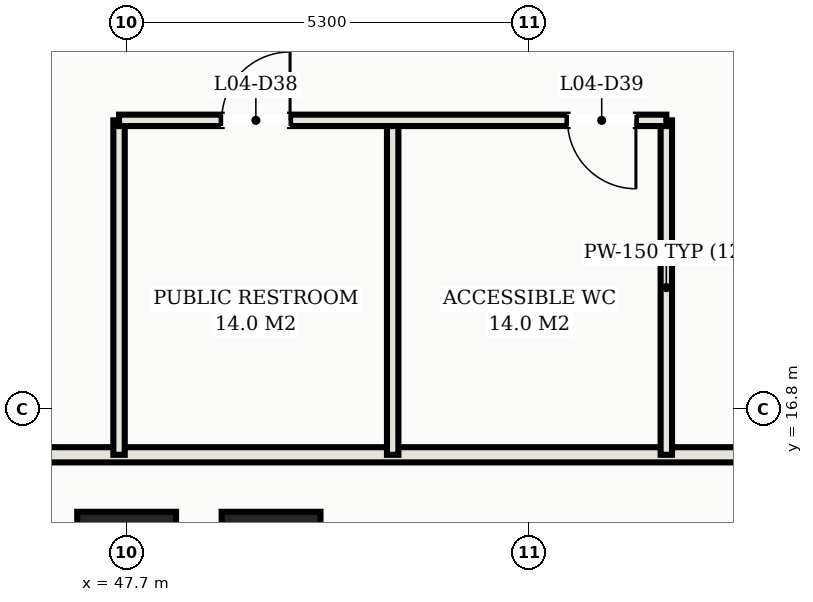
"""IFC4 building model, lengths in metres.
Left out: names, types, materials, properties, quantities, classifications, styles, units other than length and angle.
Written with IfcOpenShell. Run it as: python <this file> out.ifc"""

import sys

from ifc_helpers import new_model, si_unit, direction, frame, frame_2d, origin, origin_2d, place, context, subcontext, project, spatial, rectangle, hollow_rectangle, extrude, element, fill, save


model = new_model("IFC4")
c1 = context("Model", 3, precision=1e-05, world=origin(), true_north=direction((0.0, 1.0)))
c2 = subcontext(c1, "Body", "Model", "MODEL_VIEW")
j1 = project(units=[si_unit("LENGTHUNIT", "METRE"), si_unit("PLANEANGLEUNIT", "RADIAN")], contexts=[c1])
p1 = place(None, origin())
s1 = spatial("IfcSite", under=j1, at=p1, CompositionType="ELEMENT")
p2 = place(p1, origin())
s2 = spatial("IfcBuilding", under=s1, at=p2, CompositionType="ELEMENT")
p3 = place(p2, frame((0.0, 0.0, 19.0)))
s3 = spatial("IfcBuildingStorey", under=s2, at=p3, CompositionType="ELEMENT", Elevation=19.0)
for number, where, z_axis, x_axis in (
    (1, (47.7, 14.8, 0.0), (0.0, 0.0, 1.0), (1.0, 0.0, 0.0)),
    (2, (49.6, 14.8, 0.0), (0.0, 0.0, 1.0), (1.0, 0.0, 0.0)),
):
    element("IfcColumn", number, at=place(p3, frame(where, z_axis=z_axis, x_axis=x_axis)), inside=s3, PredefinedType="COLUMN", context=c2, shape_type="SweptSolid", body=[
        extrude(hollow_rectangle(XDim=1.3, YDim=1.3, WallThickness=0.042, at=origin_2d()), origin(), (0.0, 0.0, 1.0), 5.2),
    ])
p4 = place(p3, frame((-3.38, 16.2, 0.0), z_axis=(0.0, 0.0, 1.0), x_axis=(1.0, 0.0, 0.0)))
e3 = element("IfcWall", 3, at=p4, inside=s3, PredefinedType="PARTITIONING", context=c2, shape_type="SweptSolid", body=[
    extrude(rectangle(XDim=59.76, YDim=0.2, at=frame_2d((29.88, 0.0))), origin(), (0.0, 0.0, 1.0), 4.86),
])
p5 = place(p4, frame((16.12, 0.0, 0.0)))
e4 = element("IfcOpeningElement", 4, at=p5, cuts=e3, PredefinedType="OPENING", context=c2, shape_type="SweptSolid", body=[
    extrude(rectangle(XDim=0.92, YDim=2.15, at=frame_2d((0.46, 1.075))), frame((0.0, 0.11, 0.0), z_axis=(0.0, -1.0, 0.0), x_axis=(1.0, 0.0, 0.0)), (0.0, 0.0, 1.0), 0.22),
])
p6 = place(p4, frame((19.98, 0.0, 0.0)))
e5 = element("IfcOpeningElement", 5, at=p6, cuts=e3, PredefinedType="OPENING", context=c2, shape_type="SweptSolid", body=[
    extrude(rectangle(XDim=1.5, YDim=2.25, at=frame_2d((0.75, 1.125))), frame((0.0, 0.11, 0.0), z_axis=(0.0, -1.0, 0.0), x_axis=(1.0, 0.0, 0.0)), (0.0, 0.0, 1.0), 0.22),
])
p7 = place(p4, frame((26.08, 0.0, 0.0)))
e6 = element("IfcOpeningElement", 6, at=p7, cuts=e3, PredefinedType="OPENING", context=c2, shape_type="SweptSolid", body=[
    extrude(rectangle(XDim=1.5, YDim=2.25, at=frame_2d((0.75, 1.125))), frame((0.0, 0.11, 0.0), z_axis=(0.0, -1.0, 0.0), x_axis=(1.0, 0.0, 0.0)), (0.0, 0.0, 1.0), 0.22),
])
p8 = place(p4, frame((31.42, 0.0, 0.0)))
e7 = element("IfcOpeningElement", 7, at=p8, cuts=e3, PredefinedType="OPENING", context=c2, shape_type="SweptSolid", body=[
    extrude(rectangle(XDim=0.92, YDim=2.15, at=frame_2d((0.46, 1.075))), frame((0.0, 0.11, 0.0), z_axis=(0.0, -1.0, 0.0), x_axis=(1.0, 0.0, 0.0)), (0.0, 0.0, 1.0), 0.22),
])
p9 = place(p4, frame((36.37, 0.0, 0.0)))
e8 = element("IfcOpeningElement", 8, at=p9, cuts=e3, PredefinedType="OPENING", context=c2, shape_type="SweptSolid", body=[
    extrude(rectangle(XDim=0.92, YDim=2.15, at=frame_2d((0.46, 1.075))), frame((0.0, 0.11, 0.0), z_axis=(0.0, -1.0, 0.0), x_axis=(1.0, 0.0, 0.0)), (0.0, 0.0, 1.0), 0.22),
])
p10 = place(p4, frame((38.28, 0.0, 0.0)))
e9 = element("IfcOpeningElement", 9, at=p10, cuts=e3, PredefinedType="OPENING", context=c2, shape_type="SweptSolid", body=[
    extrude(rectangle(XDim=1.5, YDim=2.25, at=frame_2d((0.75, 1.125))), frame((0.0, 0.11, 0.0), z_axis=(0.0, -1.0, 0.0), x_axis=(1.0, 0.0, 0.0)), (0.0, 0.0, 1.0), 0.22),
])
p11 = place(p4, frame((42.93, 0.0, 0.0)))
e10 = element("IfcOpeningElement", 10, at=p11, cuts=e3, PredefinedType="OPENING", context=c2, shape_type="SweptSolid", body=[
    extrude(rectangle(XDim=1.5, YDim=2.25, at=frame_2d((0.75, 1.125))), frame((0.0, 0.11, 0.0), z_axis=(0.0, -1.0, 0.0), x_axis=(1.0, 0.0, 0.0)), (0.0, 0.0, 1.0), 0.22),
])
p12 = place(p4, frame((4.44, 0.0, 0.0)))
e11 = element("IfcOpeningElement", 11, at=p12, cuts=e3, PredefinedType="OPENING", context=c2, shape_type="SweptSolid", body=[
    extrude(rectangle(XDim=1.5, YDim=2.25, at=frame_2d((0.75, 1.125))), frame((0.0, 0.11, 0.0), z_axis=(0.0, -1.0, 0.0), x_axis=(1.0, 0.0, 0.0)), (0.0, 0.0, 1.0), 0.22),
])
p13 = place(p3, frame((47.6, 16.2, 0.0), z_axis=(0.0, 0.0, 1.0), x_axis=(0.0, 1.0, 0.0)))
e12 = element("IfcWall", 12, at=p13, inside=s3, PredefinedType="PARTITIONING", context=c2, shape_type="SweptSolid", body=[
    extrude(rectangle(XDim=4.4, YDim=0.15, at=frame_2d((2.2, 0.0))), origin(), (0.0, 0.0, 1.0), 3.055),
])
for number, where, z_axis, x_axis in (
    (13, (51.2, 16.2, 0.0), (0.0, 0.0, 1.0), (0.0, 1.0, 0.0)),
    (14, (54.8, 16.2, 0.0), (0.0, 0.0, 1.0), (0.0, 1.0, 0.0)),
):
    element("IfcWall", number, at=place(p3, frame(where, z_axis=z_axis, x_axis=x_axis)), inside=s3, PredefinedType="PARTITIONING", context=c2, shape_type="SweptSolid", body=[
        extrude(rectangle(XDim=4.4, YDim=0.15, at=frame_2d((2.2, 0.0))), origin(), (0.0, 0.0, 1.0), 4.86),
    ])
p14 = place(p3, frame((47.6, 20.6, 0.0), z_axis=(0.0, 0.0, 1.0), x_axis=(1.0, 0.0, 0.0)))
e15 = element("IfcWall", 15, at=p14, inside=s3, PredefinedType="PARTITIONING", context=c2, shape_type="SweptSolid", body=[
    extrude(rectangle(XDim=7.2, YDim=0.15, at=frame_2d((3.6, 0.0))), origin(), (0.0, 0.0, 1.0), 4.86),
])
p15 = place(p14, frame((1.35, 0.0, 0.0)))
e16 = element("IfcOpeningElement", 16, at=p15, cuts=e15, PredefinedType="OPENING", context=c2, shape_type="SweptSolid", body=[
    extrude(rectangle(XDim=0.9, YDim=2.15, at=frame_2d((0.45, 1.075))), frame((0.0, 0.085, 0.0), z_axis=(0.0, -1.0, 0.0), x_axis=(1.0, 0.0, 0.0)), (0.0, 0.0, 1.0), 0.17),
])
p16 = place(p14, frame((5.9, 0.0, 0.0)))
e17 = element("IfcOpeningElement", 17, at=p16, cuts=e15, PredefinedType="OPENING", context=c2, shape_type="SweptSolid", body=[
    extrude(rectangle(XDim=0.9, YDim=2.15, at=frame_2d((0.45, 1.075))), frame((0.0, 0.085, 0.0), z_axis=(0.0, -1.0, 0.0), x_axis=(1.0, 0.0, 0.0)), (0.0, 0.0, 1.0), 0.17),
])
p17 = place(p15, origin())
e18 = element("IfcDoor", 18, at=p17, inside=s3, OperationType="SINGLE_SWING_RIGHT", PredefinedType="DOOR", context=c2, shape_type="SweptSolid", body=[
    extrude(rectangle(XDim=0.9, YDim=2.15, at=frame_2d((0.45, 1.075))), frame((0.0, 0.025, 0.0), z_axis=(0.0, -1.0, 0.0), x_axis=(1.0, 0.0, 0.0)), (0.0, 0.0, 1.0), 0.05),
])
fill(e16, e18)
p18 = place(p16, frame((0.9, 0.0, 0.0), z_axis=(0.0, 0.0, 1.0), x_axis=(-1.0, 0.0, 0.0)))
e19 = element("IfcDoor", 19, at=p18, inside=s3, OperationType="SINGLE_SWING_LEFT", PredefinedType="DOOR", context=c2, shape_type="SweptSolid", body=[
    extrude(rectangle(XDim=0.9, YDim=2.15, at=frame_2d((0.45, 1.075))), frame((0.0, 0.025, 0.0), z_axis=(0.0, -1.0, 0.0), x_axis=(1.0, 0.0, 0.0)), (0.0, 0.0, 1.0), 0.05),
])
fill(e17, e19)
save(model, sys.argv[1])
